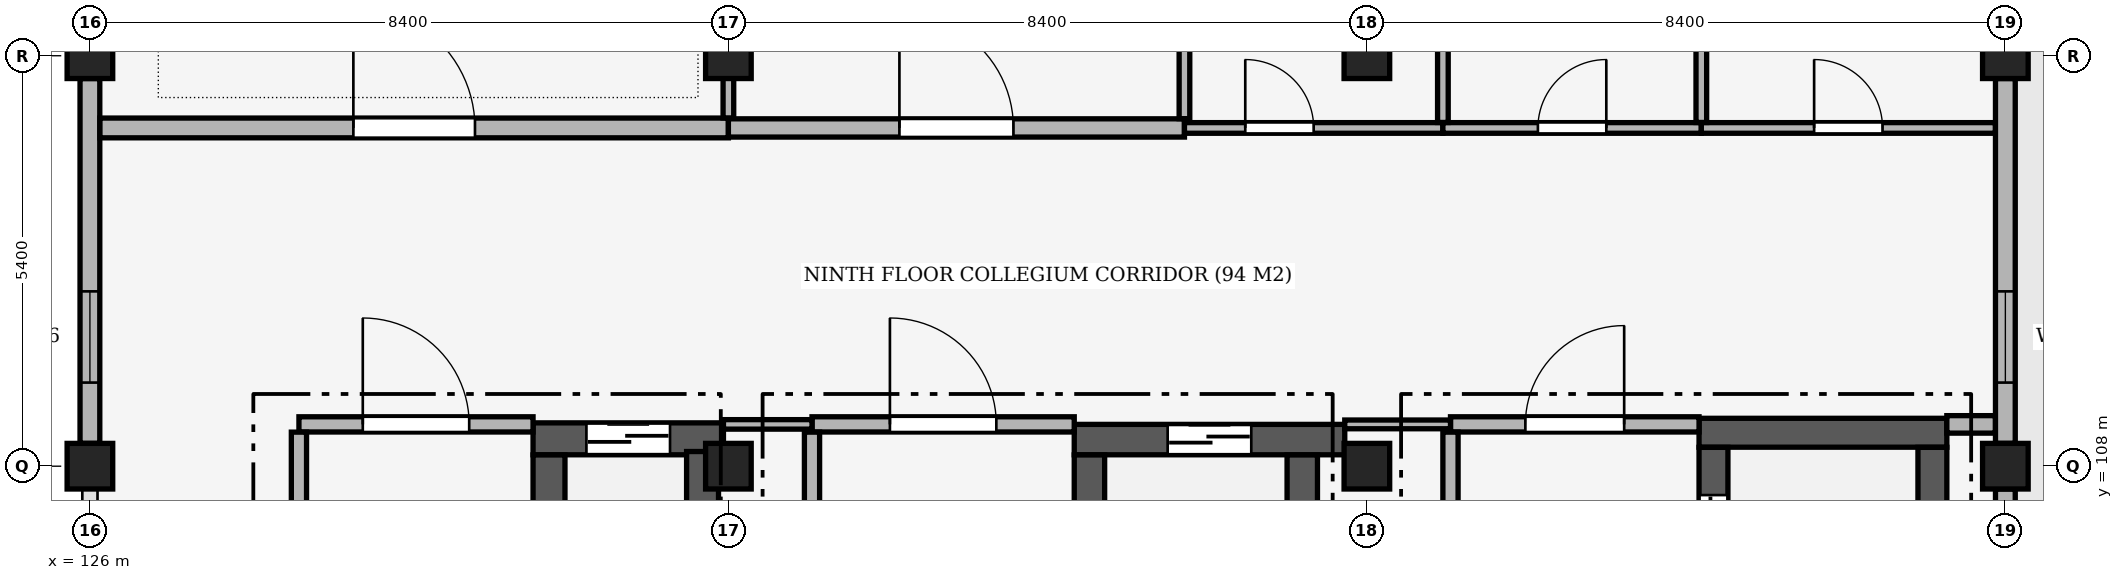
"""IFC4 building model, lengths in metres.
Left out: names, types, materials, properties, quantities, classifications, styles, units other than length and angle.
Written with IfcOpenShell. Run it as: python <this file> out.ifc"""

import sys

from ifc_helpers import new_model, si_unit, direction, frame, frame_2d, origin, origin_2d, place, context, subcontext, project, spatial, rectangle, extrude, element, fill, save


model = new_model("IFC4")
c1 = context("Model", 3, precision=1e-05, world=origin(), true_north=direction((0.0, 1.0)))
c2 = subcontext(c1, "Body", "Model", "MODEL_VIEW")
j1 = project(units=[si_unit("LENGTHUNIT", "METRE"), si_unit("PLANEANGLEUNIT", "RADIAN")], contexts=[c1])
p1 = place(None, origin())
s1 = spatial("IfcSite", under=j1, at=p1, CompositionType="ELEMENT")
p2 = place(p1, origin())
s2 = spatial("IfcBuilding", under=s1, at=p2, CompositionType="ELEMENT")
p3 = place(p2, frame((0.0, 0.0, 42.0)))
s3 = spatial("IfcBuildingStorey", under=s2, at=p3, CompositionType="ELEMENT", Elevation=42.0)
for number, where, z_axis, x_axis in (
    (1, (126.0, 108.0, 0.0), (0.0, 0.0, 1.0), (1.0, 0.0, 0.0)),
    (2, (126.0, 113.4, 0.0), (0.0, 0.0, 1.0), (1.0, 0.0, 0.0)),
    (3, (134.4, 108.0, 0.0), (0.0, 0.0, 1.0), (1.0, 0.0, 0.0)),
    (4, (134.4, 113.4, 0.0), (0.0, 0.0, 1.0), (1.0, 0.0, 0.0)),
    (5, (142.8, 108.0, 0.0), (0.0, 0.0, 1.0), (1.0, 0.0, 0.0)),
    (6, (142.8, 113.4, 0.0), (0.0, 0.0, 1.0), (1.0, 0.0, 0.0)),
    (7, (151.2, 108.0, 0.0), (0.0, 0.0, 1.0), (1.0, 0.0, 0.0)),
    (8, (151.2, 113.4, 0.0), (0.0, 0.0, 1.0), (1.0, 0.0, 0.0)),
):
    element("IfcColumn", number, at=place(p3, frame(where, z_axis=z_axis, x_axis=x_axis)), inside=s3, PredefinedType="COLUMN", context=c2, shape_type="SweptSolid", body=[
        extrude(rectangle(XDim=0.6, YDim=0.6, at=origin_2d()), origin(), (0.0, 0.0, 1.0), 3.9),
    ])
p4 = place(p3, frame((126.0, 108.3, 0.0), z_axis=(0.0, 0.0, 1.0), x_axis=(0.0, 1.0, 0.0)))
e9 = element("IfcWall", 9, at=p4, inside=s3, PredefinedType="SOLIDWALL", context=c2, shape_type="SweptSolid", body=[
    extrude(rectangle(XDim=4.8, YDim=0.26, at=frame_2d((2.4, 0.0))), origin(), (0.0, 0.0, 1.0), 3.11),
])
p5 = place(p4, frame((0.8, 0.0, 1.86)))
e10 = element("IfcOpeningElement", 10, at=p5, cuts=e9, PredefinedType="OPENING", context=c2, shape_type="SweptSolid", body=[
    extrude(rectangle(XDim=1.2, YDim=0.9, at=frame_2d((0.6, 0.45))), frame((0.0, 0.145, 0.0), z_axis=(0.0, -1.0, 0.0), x_axis=(1.0, 0.0, 0.0)), (0.0, 0.0, 1.0), 0.29),
])
p6 = place(p3, frame((151.2, 113.1, 0.0), z_axis=(0.0, 0.0, 1.0), x_axis=(0.0, -1.0, 0.0)))
e11 = element("IfcWall", 11, at=p6, inside=s3, PredefinedType="SOLIDWALL", context=c2, shape_type="SweptSolid", body=[
    extrude(rectangle(XDim=4.8, YDim=0.26, at=frame_2d((2.4, 0.0))), origin(), (0.0, 0.0, 1.0), 3.11),
])
p7 = place(p6, frame((2.8, 0.0, 1.86)))
e12 = element("IfcOpeningElement", 12, at=p7, cuts=e11, PredefinedType="OPENING", context=c2, shape_type="SweptSolid", body=[
    extrude(rectangle(XDim=1.2, YDim=0.9, at=frame_2d((0.6, 0.45))), frame((0.0, 0.145, 0.0), z_axis=(0.0, -1.0, 0.0), x_axis=(1.0, 0.0, 0.0)), (0.0, 0.0, 1.0), 0.29),
])
p8 = place(p3, frame((151.2, 107.7, 0.0), z_axis=(0.0, 0.0, 1.0), x_axis=(0.0, -1.0, 0.0)))
e13 = element("IfcWall", 13, at=p8, inside=s3, PredefinedType="SOLIDWALL", context=c2, shape_type="SweptSolid", body=[
    extrude(rectangle(XDim=7.8, YDim=0.26, at=frame_2d((3.9, 0.0))), origin(), (0.0, 0.0, 1.0), 2.96),
])
p9 = place(p8, frame((3.0, 0.0, 0.0)))
e14 = element("IfcOpeningElement", 14, at=p9, cuts=e13, PredefinedType="OPENING", context=c2, shape_type="SweptSolid", body=[
    extrude(rectangle(XDim=1.8, YDim=2.2, at=frame_2d((0.9, 1.1))), frame((0.0, 0.145, 0.0), z_axis=(0.0, -1.0, 0.0), x_axis=(1.0, 0.0, 0.0)), (0.0, 0.0, 1.0), 0.29),
])
p10 = place(p3, frame((131.83, 108.36, 0.0), z_axis=(0.0, 0.0, 1.0), x_axis=(1.0, 0.0, 0.0)))
e15 = element("IfcWall", 15, at=p10, inside=s3, PredefinedType="SHEAR", context=c2, shape_type="SweptSolid", body=[
    extrude(rectangle(XDim=2.505, YDim=0.42, at=frame_2d((1.252, 0.0))), origin(), (0.0, 0.0, 1.0), 3.9),
])
p11 = place(p10, frame((0.702, 0.0, 0.0)))
e16 = element("IfcOpeningElement", 16, at=p11, cuts=e15, PredefinedType="OPENING", context=c2, shape_type="SweptSolid", body=[
    extrude(rectangle(XDim=1.1, YDim=2.15, at=frame_2d((0.55, 1.075))), frame((0.0, 0.225, 0.0), z_axis=(0.0, -1.0, 0.0), x_axis=(1.0, 0.0, 0.0)), (0.0, 0.0, 1.0), 0.45),
])
p12 = place(p3, frame((132.04, 106.093, 0.0), z_axis=(0.0, 0.0, 1.0), x_axis=(0.0, 1.0, 0.0)))
e17 = element("IfcWall", 17, at=p12, inside=s3, PredefinedType="SHEAR", context=c2, shape_type="SweptSolid", body=[
    extrude(rectangle(XDim=2.055, YDim=0.42, at=frame_2d((1.027, 0.0))), origin(), (0.0, 0.0, 1.0), 3.9),
])
p13 = place(p3, frame((134.06, 106.093, 0.0), z_axis=(0.0, 0.0, 1.0), x_axis=(0.0, 1.0, 0.0)))
e18 = element("IfcWall", 18, at=p13, inside=s3, PredefinedType="SHEAR", context=c2, shape_type="SweptSolid", body=[
    extrude(rectangle(XDim=2.1, YDim=0.42, at=frame_2d((1.05, 0.0))), origin(), (0.0, 0.0, 1.0), 3.9),
])
p14 = place(p3, frame((138.95, 108.35, 0.0), z_axis=(0.0, 0.0, 1.0), x_axis=(1.0, 0.0, 0.0)))
e19 = element("IfcWall", 19, at=p14, inside=s3, PredefinedType="SHEAR", context=c2, shape_type="SweptSolid", body=[
    extrude(rectangle(XDim=3.559, YDim=0.4, at=frame_2d((1.78, 0.0))), origin(), (0.0, 0.0, 1.0), 3.9),
])
p15 = place(p14, frame((1.229, 0.0, 0.0)))
e20 = element("IfcOpeningElement", 20, at=p15, cuts=e19, PredefinedType="OPENING", context=c2, shape_type="SweptSolid", body=[
    extrude(rectangle(XDim=1.1, YDim=2.15, at=frame_2d((0.55, 1.075))), frame((0.0, 0.215, 0.0), z_axis=(0.0, -1.0, 0.0), x_axis=(1.0, 0.0, 0.0)), (0.0, 0.0, 1.0), 0.43),
])
for number, where, z_axis, x_axis in (
    (21, (139.15, 106.093, 0.0), (0.0, 0.0, 1.0), (0.0, 1.0, 0.0)),
    (22, (141.95, 106.093, 0.0), (0.0, 0.0, 1.0), (0.0, 1.0, 0.0)),
):
    element("IfcWall", number, at=place(p3, frame(where, z_axis=z_axis, x_axis=x_axis)), inside=s3, PredefinedType="SHEAR", context=c2, shape_type="SweptSolid", body=[
        extrude(rectangle(XDim=2.055, YDim=0.4, at=frame_2d((1.027, 0.0))), origin(), (0.0, 0.0, 1.0), 3.9),
    ])
p16 = place(p3, frame((147.17, 108.44, 0.0), z_axis=(0.0, 0.0, 1.0), x_axis=(1.0, 0.0, 0.0)))
e23 = element("IfcWall", 23, at=p16, inside=s3, PredefinedType="SHEAR", context=c2, shape_type="SweptSolid", body=[
    extrude(rectangle(XDim=3.26, YDim=0.38, at=frame_2d((1.63, 0.0))), origin(), (0.0, 0.0, 1.0), 3.9),
])
p17 = place(p3, frame((147.36, 105.793, 0.0), z_axis=(0.0, 0.0, 1.0), x_axis=(0.0, 1.0, 0.0)))
e24 = element("IfcWall", 24, at=p17, inside=s3, PredefinedType="SHEAR", context=c2, shape_type="SweptSolid", body=[
    extrude(rectangle(XDim=2.455, YDim=0.38, at=frame_2d((1.228, 0.0))), origin(), (0.0, 0.0, 1.0), 3.9),
])
p18 = place(p17, frame((0.627, 0.0, 0.0)))
e25 = element("IfcOpeningElement", 25, at=p18, cuts=e24, PredefinedType="OPENING", context=c2, shape_type="SweptSolid", body=[
    extrude(rectangle(XDim=1.2, YDim=2.15, at=frame_2d((0.6, 1.075))), frame((0.0, 0.205, 0.0), z_axis=(0.0, -1.0, 0.0), x_axis=(1.0, 0.0, 0.0)), (0.0, 0.0, 1.0), 0.41),
])
p19 = place(p3, frame((150.24, 105.793, 0.0), z_axis=(0.0, 0.0, 1.0), x_axis=(0.0, 1.0, 0.0)))
e26 = element("IfcWall", 26, at=p19, inside=s3, PredefinedType="SHEAR", context=c2, shape_type="SweptSolid", body=[
    extrude(rectangle(XDim=2.455, YDim=0.38, at=frame_2d((1.228, 0.0))), origin(), (0.0, 0.0, 1.0), 3.9),
])
p20 = place(p3, frame((128.75, 108.55, 0.0), z_axis=(0.0, 0.0, 1.0), x_axis=(1.0, 0.0, 0.0)))
e27 = element("IfcWall", 27, at=p20, inside=s3, PredefinedType="PARTITIONING", context=c2, shape_type="SweptSolid", body=[
    extrude(rectangle(XDim=3.08, YDim=0.2, at=frame_2d((1.54, 0.0))), origin(), (0.0, 0.0, 1.0), 3.66),
])
p21 = place(p20, frame((0.84, 0.0, 0.0)))
e28 = element("IfcOpeningElement", 28, at=p21, cuts=e27, PredefinedType="OPENING", context=c2, shape_type="SweptSolid", body=[
    extrude(rectangle(XDim=1.4, YDim=2.2, at=frame_2d((0.7, 1.1))), frame((0.0, 0.115, 0.0), z_axis=(0.0, -1.0, 0.0), x_axis=(1.0, 0.0, 0.0)), (0.0, 0.0, 1.0), 0.23),
])
p22 = place(p3, frame((135.5, 108.55, 0.0), z_axis=(0.0, 0.0, 1.0), x_axis=(1.0, 0.0, 0.0)))
e29 = element("IfcWall", 29, at=p22, inside=s3, PredefinedType="PARTITIONING", context=c2, shape_type="SweptSolid", body=[
    extrude(rectangle(XDim=3.45, YDim=0.2, at=frame_2d((1.725, 0.0))), origin(), (0.0, 0.0, 1.0), 3.66),
])
p23 = place(p22, frame((1.025, 0.0, 0.0)))
e30 = element("IfcOpeningElement", 30, at=p23, cuts=e29, PredefinedType="OPENING", context=c2, shape_type="SweptSolid", body=[
    extrude(rectangle(XDim=1.4, YDim=2.2, at=frame_2d((0.7, 1.1))), frame((0.0, 0.115, 0.0), z_axis=(0.0, -1.0, 0.0), x_axis=(1.0, 0.0, 0.0)), (0.0, 0.0, 1.0), 0.23),
])
p24 = place(p3, frame((143.9, 108.55, 0.0), z_axis=(0.0, 0.0, 1.0), x_axis=(1.0, 0.0, 0.0)))
e31 = element("IfcWall", 31, at=p24, inside=s3, PredefinedType="PARTITIONING", context=c2, shape_type="SweptSolid", body=[
    extrude(rectangle(XDim=3.27, YDim=0.2, at=frame_2d((1.635, 0.0))), origin(), (0.0, 0.0, 1.0), 3.66),
])
p25 = place(p24, frame((0.985, 0.0, 0.0)))
e32 = element("IfcOpeningElement", 32, at=p25, cuts=e31, PredefinedType="OPENING", context=c2, shape_type="SweptSolid", body=[
    extrude(rectangle(XDim=1.3, YDim=2.2, at=frame_2d((0.65, 1.1))), frame((0.0, 0.115, 0.0), z_axis=(0.0, -1.0, 0.0), x_axis=(1.0, 0.0, 0.0)), (0.0, 0.0, 1.0), 0.23),
])
p26 = place(p3, frame((134.335, 108.55, 0.0), z_axis=(0.0, 0.0, 1.0), x_axis=(1.0, 0.0, 0.0)))
e33 = element("IfcWall", 33, at=p26, inside=s3, PredefinedType="PARTITIONING", context=c2, shape_type="SweptSolid", body=[
    extrude(rectangle(XDim=1.165, YDim=0.125, at=frame_2d((0.583, 0.0))), origin(), (0.0, 0.0, 1.0), 3.11),
])
p27 = place(p3, frame((142.509, 108.55, 0.0), z_axis=(0.0, 0.0, 1.0), x_axis=(1.0, 0.0, 0.0)))
e34 = element("IfcWall", 34, at=p27, inside=s3, PredefinedType="PARTITIONING", context=c2, shape_type="SweptSolid", body=[
    extrude(rectangle(XDim=1.391, YDim=0.115, at=frame_2d((0.695, 0.0))), origin(), (0.0, 0.0, 1.0), 3.11),
])
p28 = place(p3, frame((150.43, 108.55, 0.0), z_axis=(0.0, 0.0, 1.0), x_axis=(1.0, 0.0, 0.0)))
e35 = element("IfcWall", 35, at=p28, inside=s3, PredefinedType="SOLIDWALL", context=c2, shape_type="SweptSolid", body=[
    extrude(rectangle(XDim=0.638, YDim=0.23, at=frame_2d((0.319, 0.0))), origin(), (0.0, 0.0, 1.0), 3.11),
])
p29 = place(p3, frame((126.132, 112.45, 0.0), z_axis=(0.0, 0.0, 1.0), x_axis=(1.0, 0.0, 0.0)))
e36 = element("IfcWall", 36, at=p29, inside=s3, PredefinedType="PARTITIONING", context=c2, shape_type="SweptSolid", body=[
    extrude(rectangle(XDim=8.268, YDim=0.26, at=frame_2d((4.134, 0.0))), origin(), (0.0, 0.0, 1.0), 3.11),
])
p30 = place(p29, frame((3.334, 0.0, 0.0)))
e37 = element("IfcOpeningElement", 37, at=p30, cuts=e36, PredefinedType="OPENING", context=c2, shape_type="SweptSolid", body=[
    extrude(rectangle(XDim=1.6, YDim=2.3, at=frame_2d((0.8, 1.15))), frame((0.0, 0.145, 0.0), z_axis=(0.0, -1.0, 0.0), x_axis=(1.0, 0.0, 0.0)), (0.0, 0.0, 1.0), 0.29),
])
p31 = place(p3, frame((134.4, 112.45, 0.0), z_axis=(0.0, 0.0, 1.0), x_axis=(1.0, 0.0, 0.0)))
e38 = element("IfcWall", 38, at=p31, inside=s3, PredefinedType="PARTITIONING", context=c2, shape_type="SweptSolid", body=[
    extrude(rectangle(XDim=6.0, YDim=0.24, at=frame_2d((3.0, 0.0))), origin(), (0.0, 0.0, 1.0), 3.11),
])
p32 = place(p31, frame((2.25, 0.0, 0.0)))
e39 = element("IfcOpeningElement", 39, at=p32, cuts=e38, PredefinedType="OPENING", context=c2, shape_type="SweptSolid", body=[
    extrude(rectangle(XDim=1.5, YDim=2.2, at=frame_2d((0.75, 1.1))), frame((0.0, 0.135, 0.0), z_axis=(0.0, -1.0, 0.0), x_axis=(1.0, 0.0, 0.0)), (0.0, 0.0, 1.0), 0.27),
])
p33 = place(p3, frame((140.4, 112.45, 0.0), z_axis=(0.0, 0.0, 1.0), x_axis=(1.0, 0.0, 0.0)))
e40 = element("IfcWall", 40, at=p33, inside=s3, PredefinedType="PARTITIONING", context=c2, shape_type="SweptSolid", body=[
    extrude(rectangle(XDim=3.4, YDim=0.14, at=frame_2d((1.7, 0.0))), origin(), (0.0, 0.0, 1.0), 3.11),
])
p34 = place(p33, frame((0.8, 0.0, 0.0)))
e41 = element("IfcOpeningElement", 41, at=p34, cuts=e40, PredefinedType="OPENING", context=c2, shape_type="SweptSolid", body=[
    extrude(rectangle(XDim=0.9, YDim=2.1, at=frame_2d((0.45, 1.05))), frame((0.0, 0.085, 0.0), z_axis=(0.0, -1.0, 0.0), x_axis=(1.0, 0.0, 0.0)), (0.0, 0.0, 1.0), 0.17),
])
p35 = place(p3, frame((143.8, 112.45, 0.0), z_axis=(0.0, 0.0, 1.0), x_axis=(1.0, 0.0, 0.0)))
e42 = element("IfcWall", 42, at=p35, inside=s3, PredefinedType="PARTITIONING", context=c2, shape_type="SweptSolid", body=[
    extrude(rectangle(XDim=3.4, YDim=0.14, at=frame_2d((1.7, 0.0))), origin(), (0.0, 0.0, 1.0), 3.66),
])
p36 = place(p35, frame((1.25, 0.0, 0.0)))
e43 = element("IfcOpeningElement", 43, at=p36, cuts=e42, PredefinedType="OPENING", context=c2, shape_type="SweptSolid", body=[
    extrude(rectangle(XDim=0.9, YDim=2.1, at=frame_2d((0.45, 1.05))), frame((0.0, 0.085, 0.0), z_axis=(0.0, -1.0, 0.0), x_axis=(1.0, 0.0, 0.0)), (0.0, 0.0, 1.0), 0.17),
])
p37 = place(p3, frame((147.2, 112.45, 0.0), z_axis=(0.0, 0.0, 1.0), x_axis=(1.0, 0.0, 0.0)))
e44 = element("IfcWall", 44, at=p37, inside=s3, PredefinedType="PARTITIONING", context=c2, shape_type="SweptSolid", body=[
    extrude(rectangle(XDim=3.868, YDim=0.14, at=frame_2d((1.934, 0.0))), origin(), (0.0, 0.0, 1.0), 3.11),
])
p38 = place(p37, frame((1.484, 0.0, 0.0)))
e45 = element("IfcOpeningElement", 45, at=p38, cuts=e44, PredefinedType="OPENING", context=c2, shape_type="SweptSolid", body=[
    extrude(rectangle(XDim=0.9, YDim=2.1, at=frame_2d((0.45, 1.05))), frame((0.0, 0.085, 0.0), z_axis=(0.0, -1.0, 0.0), x_axis=(1.0, 0.0, 0.0)), (0.0, 0.0, 1.0), 0.17),
])
p39 = place(p3, frame((128.75, 103.672, 0.0), z_axis=(0.0, 0.0, 1.0), x_axis=(0.0, 1.0, 0.0)))
e46 = element("IfcWall", 46, at=p39, inside=s3, PredefinedType="PARTITIONING", context=c2, shape_type="SweptSolid", body=[
    extrude(rectangle(XDim=4.776, YDim=0.2, at=frame_2d((2.388, 0.0))), origin(), (0.0, 0.0, 1.0), 2.96),
])
p40 = place(p3, frame((134.4, 112.582, 0.0), z_axis=(0.0, 0.0, 1.0), x_axis=(0.0, 1.0, 0.0)))
e47 = element("IfcWall", 47, at=p40, inside=s3, PredefinedType="PARTITIONING", context=c2, shape_type="SweptSolid", body=[
    extrude(rectangle(XDim=6.206, YDim=0.14, at=frame_2d((3.103, 0.0))), origin(), (0.0, 0.0, 1.0), 2.96),
])
p41 = place(p3, frame((135.5, 103.652, 0.0), z_axis=(0.0, 0.0, 1.0), x_axis=(0.0, 1.0, 0.0)))
e48 = element("IfcWall", 48, at=p41, inside=s3, PredefinedType="PARTITIONING", context=c2, shape_type="SweptSolid", body=[
    extrude(rectangle(XDim=4.796, YDim=0.2, at=frame_2d((2.398, 0.0))), origin(), (0.0, 0.0, 1.0), 2.96),
])
p42 = place(p3, frame((140.4, 112.572, 0.0), z_axis=(0.0, 0.0, 1.0), x_axis=(0.0, 1.0, 0.0)))
e49 = element("IfcWall", 49, at=p42, inside=s3, PredefinedType="PARTITIONING", context=c2, shape_type="SweptSolid", body=[
    extrude(rectangle(XDim=6.096, YDim=0.14, at=frame_2d((3.048, 0.0))), origin(), (0.0, 0.0, 1.0), 2.96),
])
p43 = place(p3, frame((143.8, 112.522, 0.0), z_axis=(0.0, 0.0, 1.0), x_axis=(0.0, 1.0, 0.0)))
e50 = element("IfcWall", 50, at=p43, inside=s3, PredefinedType="PARTITIONING", context=c2, shape_type="SweptSolid", body=[
    extrude(rectangle(XDim=6.146, YDim=0.14, at=frame_2d((3.073, 0.0))), origin(), (0.0, 0.0, 1.0), 2.96),
])
p44 = place(p3, frame((143.9, 103.632, 0.0), z_axis=(0.0, 0.0, 1.0), x_axis=(0.0, 1.0, 0.0)))
e51 = element("IfcWall", 51, at=p44, inside=s3, PredefinedType="PARTITIONING", context=c2, shape_type="SweptSolid", body=[
    extrude(rectangle(XDim=4.816, YDim=0.2, at=frame_2d((2.408, 0.0))), origin(), (0.0, 0.0, 1.0), 2.96),
])
p45 = place(p3, frame((147.2, 112.522, 0.0), z_axis=(0.0, 0.0, 1.0), x_axis=(0.0, 1.0, 0.0)))
e52 = element("IfcWall", 52, at=p45, inside=s3, PredefinedType="PARTITIONING", context=c2, shape_type="SweptSolid", body=[
    extrude(rectangle(XDim=6.146, YDim=0.14, at=frame_2d((3.073, 0.0))), origin(), (0.0, 0.0, 1.0), 2.96),
])
p46 = place(p5, origin())
e53 = element("IfcWindow", 53, at=p46, inside=s3, PartitioningType="SINGLE_PANEL", PredefinedType="WINDOW", context=c2, shape_type="SweptSolid", body=[
    extrude(rectangle(XDim=1.2, YDim=0.9, at=frame_2d((0.6, 0.45))), frame((0.0, 0.03, 0.0), z_axis=(0.0, -1.0, 0.0), x_axis=(1.0, 0.0, 0.0)), (0.0, 0.0, 1.0), 0.06),
])
fill(e10, e53)
p47 = place(p7, origin())
e54 = element("IfcWindow", 54, at=p47, inside=s3, PartitioningType="SINGLE_PANEL", PredefinedType="WINDOW", context=c2, shape_type="SweptSolid", body=[
    extrude(rectangle(XDim=1.2, YDim=0.9, at=frame_2d((0.6, 0.45))), frame((0.0, 0.03, 0.0), z_axis=(0.0, -1.0, 0.0), x_axis=(1.0, 0.0, 0.0)), (0.0, 0.0, 1.0), 0.06),
])
fill(e12, e54)
p48 = place(p11, origin())
e55 = element("IfcDoor", 55, at=p48, inside=s3, OperationType="DOUBLE_DOOR_SLIDING", PredefinedType="DOOR", context=c2, shape_type="SweptSolid", body=[
    extrude(rectangle(XDim=1.1, YDim=2.15, at=frame_2d((0.55, 1.075))), frame((0.0, 0.025, 0.0), z_axis=(0.0, -1.0, 0.0), x_axis=(1.0, 0.0, 0.0)), (0.0, 0.0, 1.0), 0.05),
])
fill(e16, e55)
p49 = place(p15, origin())
e56 = element("IfcDoor", 56, at=p49, inside=s3, OperationType="DOUBLE_DOOR_SLIDING", PredefinedType="DOOR", context=c2, shape_type="SweptSolid", body=[
    extrude(rectangle(XDim=1.1, YDim=2.15, at=frame_2d((0.55, 1.075))), frame((0.0, 0.025, 0.0), z_axis=(0.0, -1.0, 0.0), x_axis=(1.0, 0.0, 0.0)), (0.0, 0.0, 1.0), 0.05),
])
fill(e20, e56)
p50 = place(p18, origin())
e57 = element("IfcDoor", 57, at=p50, inside=s3, OperationType="DOUBLE_DOOR_SLIDING", PredefinedType="DOOR", context=c2, shape_type="SweptSolid", body=[
    extrude(rectangle(XDim=1.2, YDim=2.15, at=frame_2d((0.6, 1.075))), frame((0.0, 0.025, 0.0), z_axis=(0.0, -1.0, 0.0), x_axis=(1.0, 0.0, 0.0)), (0.0, 0.0, 1.0), 0.05),
])
fill(e25, e57)
p51 = place(p21, origin())
e58 = element("IfcDoor", 58, at=p51, inside=s3, OperationType="SINGLE_SWING_LEFT", PredefinedType="DOOR", context=c2, shape_type="SweptSolid", body=[
    extrude(rectangle(XDim=1.4, YDim=2.2, at=frame_2d((0.7, 1.1))), frame((0.0, 0.025, 0.0), z_axis=(0.0, -1.0, 0.0), x_axis=(1.0, 0.0, 0.0)), (0.0, 0.0, 1.0), 0.05),
])
fill(e28, e58)
p52 = place(p23, origin())
e59 = element("IfcDoor", 59, at=p52, inside=s3, OperationType="SINGLE_SWING_LEFT", PredefinedType="DOOR", context=c2, shape_type="SweptSolid", body=[
    extrude(rectangle(XDim=1.4, YDim=2.2, at=frame_2d((0.7, 1.1))), frame((0.0, 0.025, 0.0), z_axis=(0.0, -1.0, 0.0), x_axis=(1.0, 0.0, 0.0)), (0.0, 0.0, 1.0), 0.05),
])
fill(e30, e59)
p53 = place(p25, origin())
e60 = element("IfcDoor", 60, at=p53, inside=s3, OperationType="SINGLE_SWING_RIGHT", PredefinedType="DOOR", context=c2, shape_type="SweptSolid", body=[
    extrude(rectangle(XDim=1.3, YDim=2.2, at=frame_2d((0.65, 1.1))), frame((0.0, 0.025, 0.0), z_axis=(0.0, -1.0, 0.0), x_axis=(1.0, 0.0, 0.0)), (0.0, 0.0, 1.0), 0.05),
])
fill(e32, e60)
p54 = place(p30, origin())
e61 = element("IfcDoor", 61, at=p54, inside=s3, OperationType="SINGLE_SWING_LEFT", PredefinedType="DOOR", context=c2, shape_type="SweptSolid", body=[
    extrude(rectangle(XDim=1.6, YDim=2.3, at=frame_2d((0.8, 1.15))), frame((0.0, 0.025, 0.0), z_axis=(0.0, -1.0, 0.0), x_axis=(1.0, 0.0, 0.0)), (0.0, 0.0, 1.0), 0.05),
])
fill(e37, e61)
p55 = place(p32, origin())
e62 = element("IfcDoor", 62, at=p55, inside=s3, OperationType="SINGLE_SWING_LEFT", PredefinedType="DOOR", context=c2, shape_type="SweptSolid", body=[
    extrude(rectangle(XDim=1.5, YDim=2.2, at=frame_2d((0.75, 1.1))), frame((0.0, 0.025, 0.0), z_axis=(0.0, -1.0, 0.0), x_axis=(1.0, 0.0, 0.0)), (0.0, 0.0, 1.0), 0.05),
])
fill(e39, e62)
p56 = place(p34, origin())
e63 = element("IfcDoor", 63, at=p56, inside=s3, OperationType="SINGLE_SWING_LEFT", PredefinedType="DOOR", context=c2, shape_type="SweptSolid", body=[
    extrude(rectangle(XDim=0.9, YDim=2.1, at=frame_2d((0.45, 1.05))), frame((0.0, 0.025, 0.0), z_axis=(0.0, -1.0, 0.0), x_axis=(1.0, 0.0, 0.0)), (0.0, 0.0, 1.0), 0.05),
])
fill(e41, e63)
p57 = place(p36, origin())
e64 = element("IfcDoor", 64, at=p57, inside=s3, OperationType="SINGLE_SWING_RIGHT", PredefinedType="DOOR", context=c2, shape_type="SweptSolid", body=[
    extrude(rectangle(XDim=0.9, YDim=2.1, at=frame_2d((0.45, 1.05))), frame((0.0, 0.025, 0.0), z_axis=(0.0, -1.0, 0.0), x_axis=(1.0, 0.0, 0.0)), (0.0, 0.0, 1.0), 0.05),
])
fill(e43, e64)
p58 = place(p38, origin())
e65 = element("IfcDoor", 65, at=p58, inside=s3, OperationType="SINGLE_SWING_LEFT", PredefinedType="DOOR", context=c2, shape_type="SweptSolid", body=[
    extrude(rectangle(XDim=0.9, YDim=2.1, at=frame_2d((0.45, 1.05))), frame((0.0, 0.025, 0.0), z_axis=(0.0, -1.0, 0.0), x_axis=(1.0, 0.0, 0.0)), (0.0, 0.0, 1.0), 0.05),
])
fill(e45, e65)
save(model, sys.argv[1])
